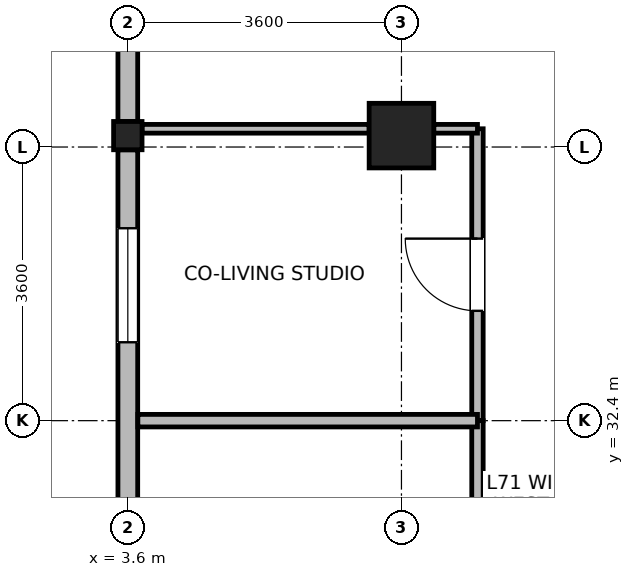
"""IFC4 building model, lengths in metres.
Left out: names, types, materials, properties, quantities, classifications, styles, units other than length and angle.
Written with IfcOpenShell. Run it as: python <this file> out.ifc"""

import sys

from ifc_helpers import new_model, si_unit, direction, frame, frame_2d, origin, origin_2d, place, context, subcontext, project, spatial, rectangle, i_section, extrude, source, transform, mapped, element, fill, save


model = new_model("IFC4")
c1 = context("Model", 3, precision=1e-05, world=origin(), true_north=direction((0.0, 1.0)))
c2 = subcontext(c1, "Body", "Model", "MODEL_VIEW")
j1 = project(units=[si_unit("LENGTHUNIT", "METRE"), si_unit("PLANEANGLEUNIT", "RADIAN")], contexts=[c1])
p1 = place(None, origin())
s1 = spatial("IfcSite", under=j1, at=p1, CompositionType="ELEMENT")
p2 = place(p1, origin())
s2 = spatial("IfcBuilding", under=s1, at=p2, CompositionType="ELEMENT")
p3 = place(p2, frame((0.0, 0.0, 275.8)))
s3 = spatial("IfcBuildingStorey", under=s2, at=p3, CompositionType="ELEMENT", Elevation=275.8)
m1 = source(origin(), c2, "Body", "SweptSolid", [
    extrude(rectangle(XDim=0.85, YDim=0.85, at=origin_2d()), origin(), (0.0, 0.0, 1.0), 3.7),
])
p4 = place(p3, frame((7.2, 36.15, 0.0), z_axis=(0.0, 0.0, 1.0), x_axis=(1.0, 0.0, 0.0)))
e1 = element("IfcColumn", 1, at=p4, inside=s3, PredefinedType="COLUMN", context=c2, shape_type="MappedRepresentation", body=[
    mapped(m1, transform((0.0, 0.0, 0.0), x_axis=(1.0, 0.0, 0.0), y_axis=(0.0, 1.0, 0.0), z_axis=(0.0, 0.0, 1.0), scale=1.0)),
])
m2 = source(origin(), c2, "Body", "SweptSolid", [
    extrude(i_section(OverallWidth=0.374, OverallDepth=0.372, WebThickness=0.015, FlangeThickness=0.026, FilletRadius=0.015, at=origin_2d()), origin(), (0.0, 0.0, 1.0), 3.7),
])
p5 = place(p3, frame((3.6, 36.15, 0.0), z_axis=(0.0, 0.0, 1.0), x_axis=(1.0, 0.0, 0.0)))
e2 = element("IfcColumn", 2, at=p5, inside=s3, PredefinedType="COLUMN", context=c2, shape_type="MappedRepresentation", body=[
    mapped(m2, transform((0.0, 0.0, 0.0), x_axis=(1.0, 0.0, 0.0), y_axis=(0.0, 1.0, 0.0), z_axis=(0.0, 0.0, 1.0), scale=1.0)),
])
p6 = place(p3, frame((3.6, 36.337, 0.0), z_axis=(0.0, 0.0, 1.0), x_axis=(0.0, 1.0, 0.0)))
e3 = element("IfcWall", 3, at=p6, inside=s3, PredefinedType="STANDARD", context=c2, shape_type="SweptSolid", body=[
    extrude(rectangle(XDim=3.393, YDim=0.26, at=frame_2d((1.697, 0.0))), origin(), (0.0, 0.0, 1.0), 3.455),
])
p7 = place(p6, frame((0.947, 0.0, 0.85)))
e4 = element("IfcOpeningElement", 4, at=p7, cuts=e3, PredefinedType="OPENING", context=c2, shape_type="SweptSolid", body=[
    extrude(rectangle(XDim=1.5, YDim=1.85, at=frame_2d((0.75, 0.925))), frame((0.0, 0.14, 0.0), z_axis=(0.0, -1.0, 0.0), x_axis=(1.0, 0.0, 0.0)), (0.0, 0.0, 1.0), 0.28),
])
p8 = place(p3, frame((3.6, 28.837, 0.0), z_axis=(0.0, 0.0, 1.0), x_axis=(0.0, 1.0, 0.0)))
e5 = element("IfcWall", 5, at=p8, inside=s3, PredefinedType="STANDARD", context=c2, shape_type="SweptSolid", body=[
    extrude(rectangle(XDim=7.126, YDim=0.26, at=frame_2d((3.563, 0.0))), origin(), (0.0, 0.0, 1.0), 3.055),
])
p9 = place(p8, frame((1.031, 0.0, 0.85)))
e6 = element("IfcOpeningElement", 6, at=p9, cuts=e5, PredefinedType="OPENING", context=c2, shape_type="SweptSolid", body=[
    extrude(rectangle(XDim=1.5, YDim=1.85, at=frame_2d((0.75, 0.925))), frame((0.0, 0.14, 0.0), z_axis=(0.0, -1.0, 0.0), x_axis=(1.0, 0.0, 0.0)), (0.0, 0.0, 1.0), 0.28),
])
p10 = place(p8, frame((4.594, 0.0, 0.85)))
e7 = element("IfcOpeningElement", 7, at=p10, cuts=e5, PredefinedType="OPENING", context=c2, shape_type="SweptSolid", body=[
    extrude(rectangle(XDim=1.5, YDim=1.85, at=frame_2d((0.75, 0.925))), frame((0.0, 0.14, 0.0), z_axis=(0.0, -1.0, 0.0), x_axis=(1.0, 0.0, 0.0)), (0.0, 0.0, 1.0), 0.28),
])
p11 = place(p3, frame((8.2, 32.4, 0.0), z_axis=(0.0, 0.0, 1.0), x_axis=(0.0, 1.0, 0.0)))
e8 = element("IfcWall", 8, at=p11, inside=s3, PredefinedType="PARTITIONING", context=c2, shape_type="SweptSolid", body=[
    extrude(rectangle(XDim=3.84, YDim=0.15, at=frame_2d((1.92, 0.0))), origin(), (0.0, 0.0, 1.0), 3.455),
])
p12 = place(p11, frame((1.445, 0.0, 0.0)))
e9 = element("IfcOpeningElement", 9, at=p12, cuts=e8, PredefinedType="OPENING", context=c2, shape_type="SweptSolid", body=[
    extrude(rectangle(XDim=0.95, YDim=2.1, at=frame_2d((0.475, 1.05))), frame((0.0, 0.085, 0.0), z_axis=(0.0, -1.0, 0.0), x_axis=(1.0, 0.0, 0.0)), (0.0, 0.0, 1.0), 0.17),
])
p13 = place(p3, frame((8.2, 28.56, 0.0), z_axis=(0.0, 0.0, 1.0), x_axis=(0.0, 1.0, 0.0)))
e10 = element("IfcWall", 10, at=p13, inside=s3, PredefinedType="PARTITIONING", context=c2, shape_type="SweptSolid", body=[
    extrude(rectangle(XDim=3.84, YDim=0.15, at=frame_2d((1.92, 0.0))), origin(), (0.0, 0.0, 1.0), 3.455),
])
p14 = place(p3, frame((3.732, 32.4, 0.0), z_axis=(0.0, 0.0, 1.0), x_axis=(1.0, 0.0, 0.0)))
e11 = element("IfcWall", 11, at=p14, inside=s3, PredefinedType="PARTITIONING", context=c2, shape_type="SweptSolid", body=[
    extrude(rectangle(XDim=4.468, YDim=0.165, at=frame_2d((2.234, 0.0))), origin(), (0.0, 0.0, 1.0), 3.455),
])
p15 = place(p3, frame((3.787, 36.24, 0.0), z_axis=(0.0, 0.0, 1.0), x_axis=(1.0, 0.0, 0.0)))
e12 = element("IfcWall", 12, at=p15, inside=s3, PredefinedType="PARTITIONING", context=c2, shape_type="SweptSolid", body=[
    extrude(rectangle(XDim=2.988, YDim=0.115, at=frame_2d((1.494, 0.0))), origin(), (0.0, 0.0, 1.0), 2.905),
])
p16 = place(p3, frame((7.625, 36.24, 0.0), z_axis=(0.0, 0.0, 1.0), x_axis=(1.0, 0.0, 0.0)))
e13 = element("IfcWall", 13, at=p16, inside=s3, PredefinedType="PARTITIONING", context=c2, shape_type="SweptSolid", body=[
    extrude(rectangle(XDim=0.575, YDim=0.115, at=frame_2d((0.288, 0.0))), origin(), (0.0, 0.0, 1.0), 2.905),
])
p17 = place(p10, origin())
e14 = element("IfcWindow", 14, at=p17, inside=s3, PartitioningType="SINGLE_PANEL", PredefinedType="WINDOW", context=c2, shape_type="SweptSolid", body=[
    extrude(rectangle(XDim=1.5, YDim=1.85, at=frame_2d((0.75, 0.925))), frame((0.0, 0.03, 0.0), z_axis=(0.0, -1.0, 0.0), x_axis=(1.0, 0.0, 0.0)), (0.0, 0.0, 1.0), 0.06),
])
fill(e7, e14)
p18 = place(p12, origin())
e15 = element("IfcDoor", 15, at=p18, inside=s3, OperationType="SINGLE_SWING_RIGHT", PredefinedType="DOOR", context=c2, shape_type="SweptSolid", body=[
    extrude(rectangle(XDim=0.95, YDim=2.1, at=frame_2d((0.475, 1.05))), frame((0.0, 0.025, 0.0), z_axis=(0.0, -1.0, 0.0), x_axis=(1.0, 0.0, 0.0)), (0.0, 0.0, 1.0), 0.05),
])
fill(e9, e15)
save(model, sys.argv[1])
